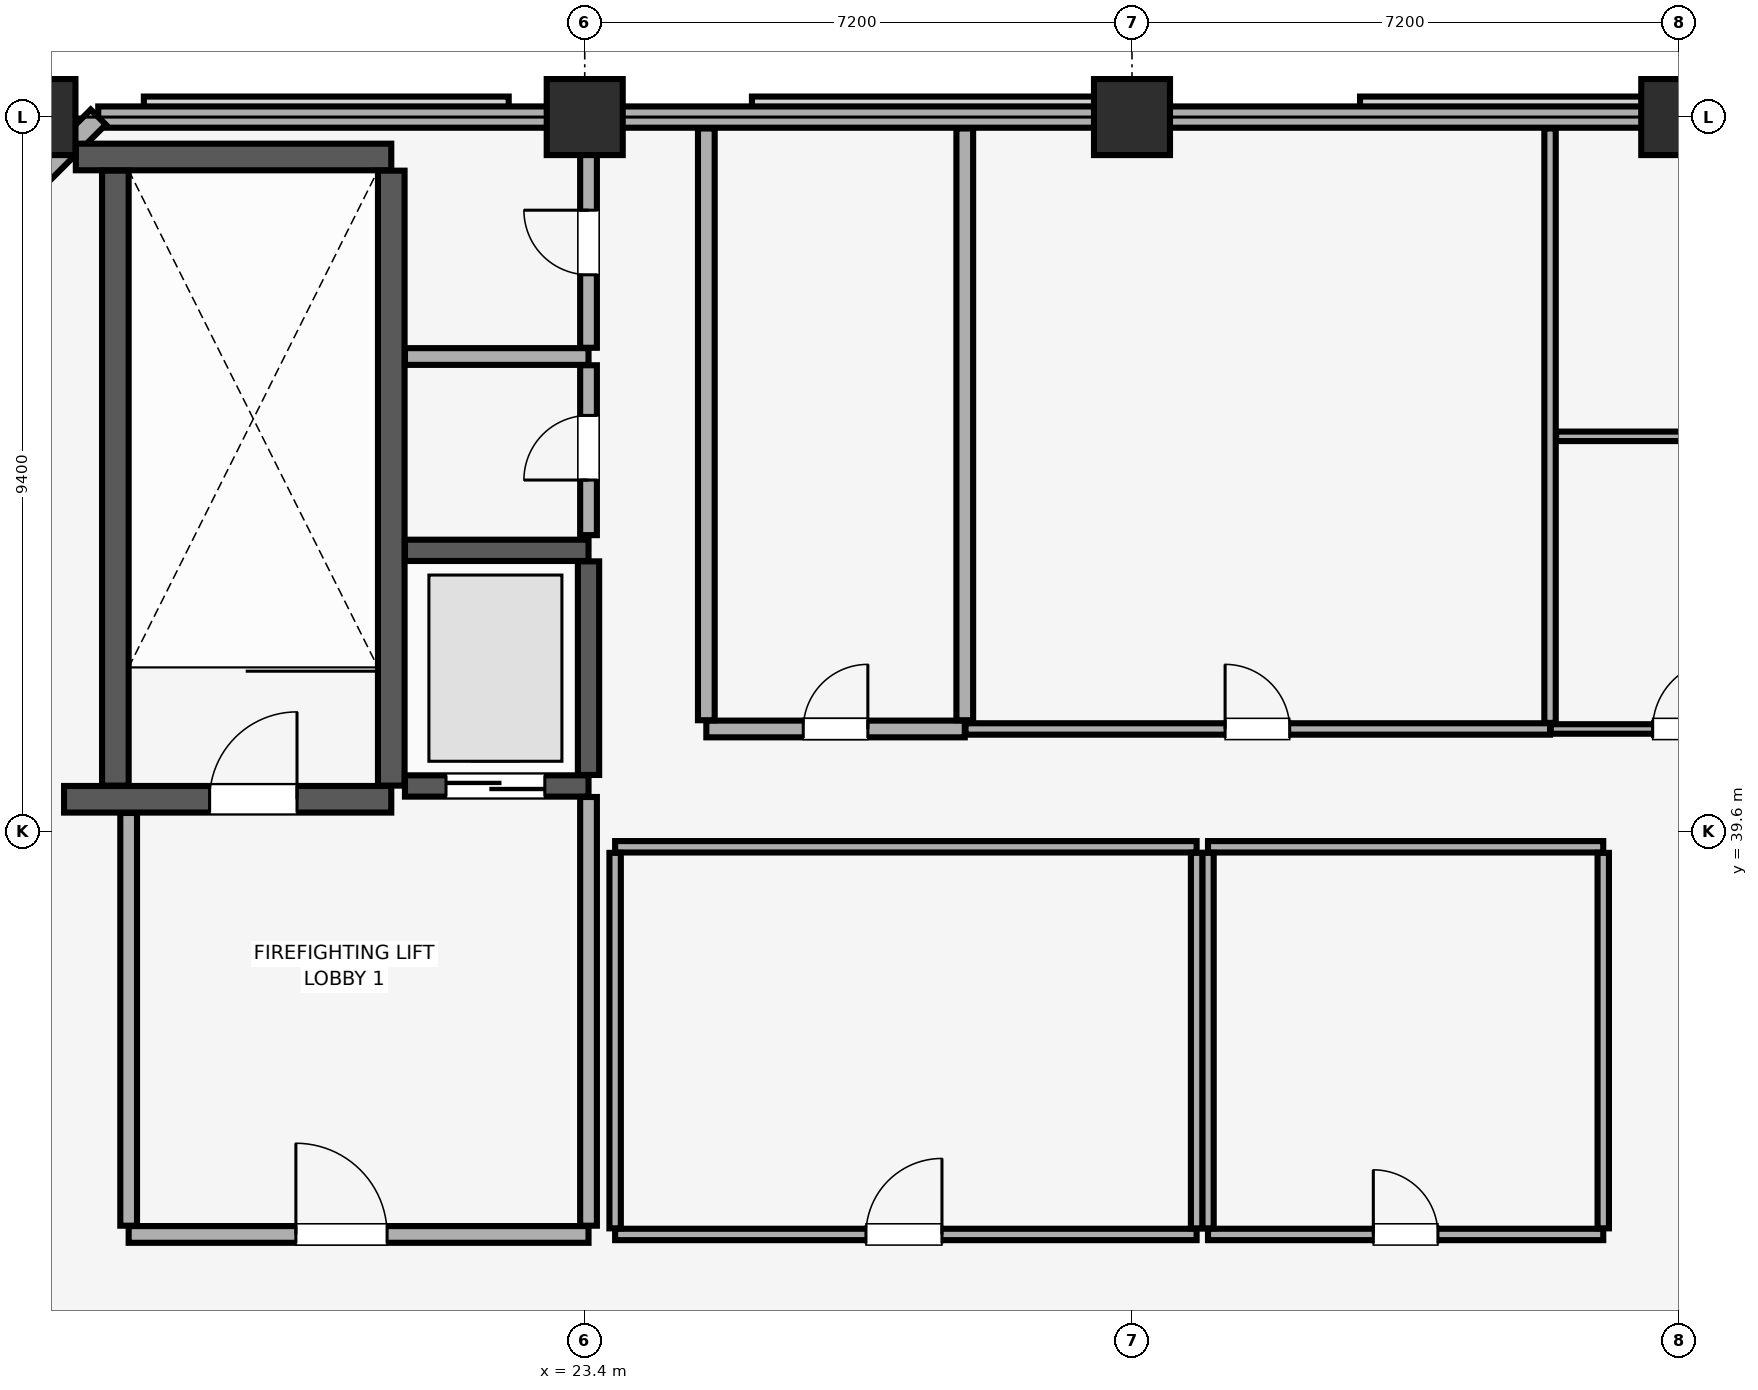
"""IFC4 building model, lengths in metres.
Left out: names, types, materials, properties, quantities, classifications, styles, units other than length and angle.
Written with IfcOpenShell. Run it as: python <this file> out.ifc"""

import sys

from ifc_helpers import new_model, si_unit, direction, frame, frame_2d, origin, origin_2d, place, context, subcontext, project, spatial, rectangle, extrude, element, fill, save


model = new_model("IFC4")
c1 = context("Model", 3, precision=1e-05, world=origin(), true_north=direction((0.0, 1.0)))
c2 = subcontext(c1, "Body", "Model", "MODEL_VIEW")
j1 = project(units=[si_unit("LENGTHUNIT", "METRE"), si_unit("PLANEANGLEUNIT", "RADIAN")], contexts=[c1])
p1 = place(None, origin())
s1 = spatial("IfcSite", under=j1, at=p1, CompositionType="ELEMENT")
p2 = place(p1, origin())
s2 = spatial("IfcBuilding", under=s1, at=p2, CompositionType="ELEMENT")
p3 = place(p2, frame((0.0, 0.0, 310.7)))
s3 = spatial("IfcBuildingStorey", under=s2, at=p3, CompositionType="ELEMENT", Elevation=310.7)
for number, where, z_axis, x_axis in (
    (1, (16.2, 49.0, 0.0), (0.0, 0.0, 1.0), (1.0, 0.0, 0.0)),
    (2, (23.4, 49.0, 0.0), (0.0, 0.0, 1.0), (1.0, 0.0, 0.0)),
    (3, (30.6, 49.0, 0.0), (0.0, 0.0, 1.0), (1.0, 0.0, 0.0)),
    (4, (37.8, 49.0, 0.0), (0.0, 0.0, 1.0), (1.0, 0.0, 0.0)),
):
    element("IfcColumn", number, at=place(p3, frame(where, z_axis=z_axis, x_axis=x_axis)), inside=s3, PredefinedType="COLUMN", context=c2, shape_type="SweptSolid", body=[
        extrude(rectangle(XDim=1.0, YDim=1.0, at=origin_2d()), origin(), (0.0, 0.0, 1.0), 7.5),
    ])
p4 = place(p3, frame((67.0, 49.0, 0.0), z_axis=(0.0, 0.0, 1.0), x_axis=(-1.0, 0.0, 0.0)))
e5 = element("IfcWall", 5, at=p4, inside=s3, PredefinedType="SOLIDWALL", context=c2, shape_type="SweptSolid", body=[
    extrude(rectangle(XDim=50.0, YDim=0.28, at=frame_2d((25.0, 0.0))), origin(), (0.0, 0.0, 1.0), 7.0),
])
p5 = place(p3, frame((17.0, 49.0, 0.0), z_axis=(0.0, 0.0, 1.0), x_axis=(-0.707106781187, -0.707106781187, 0.0)))
e6 = element("IfcWall", 6, at=p5, inside=s3, PredefinedType="SOLIDWALL", context=c2, shape_type="SweptSolid", body=[
    extrude(rectangle(XDim=1.131, YDim=0.28, at=frame_2d((0.566, 0.0))), origin(), (0.0, 0.0, 1.0), 7.5),
])
p6 = place(p3, frame((16.55, 40.025, 0.0), z_axis=(0.0, 0.0, 1.0), x_axis=(1.0, 0.0, 0.0)))
e7 = element("IfcWall", 7, at=p6, inside=s3, PredefinedType="SHEAR", context=c2, shape_type="SweptSolid", body=[
    extrude(rectangle(XDim=4.305, YDim=0.35, at=frame_2d((2.152, 0.0))), origin(), (0.0, 0.0, 1.0), 7.5),
])
p7 = place(p6, frame((1.915, 0.0, 0.0)))
e8 = element("IfcOpeningElement", 8, at=p7, cuts=e7, PredefinedType="OPENING", context=c2, shape_type="SweptSolid", body=[
    extrude(rectangle(XDim=1.15, YDim=2.15, at=frame_2d((0.575, 1.075))), frame((0.0, 0.185, 0.0), z_axis=(0.0, -1.0, 0.0), x_axis=(1.0, 0.0, 0.0)), (0.0, 0.0, 1.0), 0.37),
])
p8 = place(p3, frame((16.705, 48.475, 0.0), z_axis=(0.0, 0.0, 1.0), x_axis=(1.0, 0.0, 0.0)))
e9 = element("IfcWall", 9, at=p8, inside=s3, PredefinedType="SHEAR", context=c2, shape_type="SweptSolid", body=[
    extrude(rectangle(XDim=4.15, YDim=0.35, at=frame_2d((2.075, 0.0))), origin(), (0.0, 0.0, 1.0), 7.5),
])
for number, where, z_axis, x_axis in (
    (10, (17.225, 40.205, 0.0), (0.0, 0.0, 1.0), (0.0, 1.0, 0.0)),
    (11, (20.855, 40.205, 0.0), (0.0, 0.0, 1.0), (0.0, 1.0, 0.0)),
):
    element("IfcWall", number, at=place(p3, frame(where, z_axis=z_axis, x_axis=x_axis)), inside=s3, PredefinedType="SHEAR", context=c2, shape_type="SweptSolid", body=[
        extrude(rectangle(XDim=8.09, YDim=0.35, at=frame_2d((4.045, 0.0))), origin(), (0.0, 0.0, 1.0), 7.5),
    ])
p9 = place(p3, frame((21.035, 40.2, 0.0), z_axis=(0.0, 0.0, 1.0), x_axis=(1.0, 0.0, 0.0)))
e12 = element("IfcWall", 12, at=p9, inside=s3, PredefinedType="SHEAR", context=c2, shape_type="SweptSolid", body=[
    extrude(rectangle(XDim=2.415, YDim=0.28, at=frame_2d((1.208, 0.0))), origin(), (0.0, 0.0, 1.0), 7.5),
])
p10 = place(p9, frame((0.54, 0.0, 0.0)))
e13 = element("IfcOpeningElement", 13, at=p10, cuts=e12, PredefinedType="OPENING", context=c2, shape_type="SweptSolid", body=[
    extrude(rectangle(XDim=1.3, YDim=2.3, at=frame_2d((0.65, 1.15))), frame((0.0, 0.15, 0.0), z_axis=(0.0, -1.0, 0.0), x_axis=(1.0, 0.0, 0.0)), (0.0, 0.0, 1.0), 0.3),
])
p11 = place(p3, frame((21.035, 43.3, 0.0), z_axis=(0.0, 0.0, 1.0), x_axis=(1.0, 0.0, 0.0)))
e14 = element("IfcWall", 14, at=p11, inside=s3, PredefinedType="SHEAR", context=c2, shape_type="SweptSolid", body=[
    extrude(rectangle(XDim=2.415, YDim=0.28, at=frame_2d((1.208, 0.0))), origin(), (0.0, 0.0, 1.0), 7.5),
])
p12 = place(p3, frame((23.45, 40.345, 0.0), z_axis=(0.0, 0.0, 1.0), x_axis=(0.0, 1.0, 0.0)))
e15 = element("IfcWall", 15, at=p12, inside=s3, PredefinedType="SHEAR", context=c2, shape_type="SweptSolid", body=[
    extrude(rectangle(XDim=2.81, YDim=0.28, at=frame_2d((1.405, 0.0))), origin(), (0.0, 0.0, 1.0), 7.5),
])
p13 = place(p3, frame((17.4, 34.3, 0.0), z_axis=(0.0, 0.0, 1.0), x_axis=(1.0, 0.0, 0.0)))
e16 = element("IfcWall", 16, at=p13, inside=s3, PredefinedType="PARTITIONING", context=c2, shape_type="SweptSolid", body=[
    extrude(rectangle(XDim=6.05, YDim=0.22, at=frame_2d((3.025, 0.0))), origin(), (0.0, 0.0, 1.0), 7.5),
])
p14 = place(p13, frame((2.2, 0.0, 0.0)))
e17 = element("IfcOpeningElement", 17, at=p14, cuts=e16, PredefinedType="OPENING", context=c2, shape_type="SweptSolid", body=[
    extrude(rectangle(XDim=1.2, YDim=2.15, at=frame_2d((0.6, 1.075))), frame((0.0, 0.12, 0.0), z_axis=(0.0, -1.0, 0.0), x_axis=(1.0, 0.0, 0.0)), (0.0, 0.0, 1.0), 0.24),
])
p15 = place(p3, frame((17.4, 34.415, 0.0), z_axis=(0.0, 0.0, 1.0), x_axis=(0.0, 1.0, 0.0)))
e18 = element("IfcWall", 18, at=p15, inside=s3, PredefinedType="PARTITIONING", context=c2, shape_type="SweptSolid", body=[
    extrude(rectangle(XDim=5.43, YDim=0.22, at=frame_2d((2.715, 0.0))), origin(), (0.0, 0.0, 1.0), 7.5),
])
p16 = place(p3, frame((23.45, 34.415, 0.0), z_axis=(0.0, 0.0, 1.0), x_axis=(0.0, 1.0, 0.0)))
e19 = element("IfcWall", 19, at=p16, inside=s3, PredefinedType="PARTITIONING", context=c2, shape_type="SweptSolid", body=[
    extrude(rectangle(XDim=5.64, YDim=0.22, at=frame_2d((2.82, 0.0))), origin(), (0.0, 0.0, 1.0), 7.5),
])
p17 = place(p3, frame((21.035, 45.85, 0.0), z_axis=(0.0, 0.0, 1.0), x_axis=(1.0, 0.0, 0.0)))
e20 = element("IfcWall", 20, at=p17, inside=s3, PredefinedType="PARTITIONING", context=c2, shape_type="SweptSolid", body=[
    extrude(rectangle(XDim=2.415, YDim=0.22, at=frame_2d((1.208, 0.0))), origin(), (0.0, 0.0, 1.0), 7.5),
])
p18 = place(p3, frame((23.45, 43.5, 0.0), z_axis=(0.0, 0.0, 1.0), x_axis=(0.0, 1.0, 0.0)))
e21 = element("IfcWall", 21, at=p18, inside=s3, PredefinedType="PARTITIONING", context=c2, shape_type="SweptSolid", body=[
    extrude(rectangle(XDim=2.235, YDim=0.22, at=frame_2d((1.118, 0.0))), origin(), (0.0, 0.0, 1.0), 7.5),
])
p19 = place(p18, frame((0.725, 0.0, 0.0)))
e22 = element("IfcOpeningElement", 22, at=p19, cuts=e21, PredefinedType="OPENING", context=c2, shape_type="SweptSolid", body=[
    extrude(rectangle(XDim=0.85, YDim=2.1, at=frame_2d((0.425, 1.05))), frame((0.0, 0.12, 0.0), z_axis=(0.0, -1.0, 0.0), x_axis=(1.0, 0.0, 0.0)), (0.0, 0.0, 1.0), 0.24),
])
p20 = place(p3, frame((23.45, 45.965, 0.0), z_axis=(0.0, 0.0, 1.0), x_axis=(0.0, 1.0, 0.0)))
e23 = element("IfcWall", 23, at=p20, inside=s3, PredefinedType="PARTITIONING", context=c2, shape_type="SweptSolid", body=[
    extrude(rectangle(XDim=2.885, YDim=0.22, at=frame_2d((1.442, 0.0))), origin(), (0.0, 0.0, 1.0), 7.5),
])
p21 = place(p20, frame((0.96, 0.0, 0.0)))
e24 = element("IfcOpeningElement", 24, at=p21, cuts=e23, PredefinedType="OPENING", context=c2, shape_type="SweptSolid", body=[
    extrude(rectangle(XDim=0.85, YDim=2.1, at=frame_2d((0.425, 1.05))), frame((0.0, 0.12, 0.0), z_axis=(0.0, -1.0, 0.0), x_axis=(1.0, 0.0, 0.0)), (0.0, 0.0, 1.0), 0.24),
])
p22 = place(p3, frame((31.6, 34.3, 0.0), z_axis=(0.0, 0.0, 1.0), x_axis=(1.0, 0.0, 0.0)))
e25 = element("IfcWall", 25, at=p22, inside=s3, PredefinedType="PARTITIONING", context=c2, shape_type="SweptSolid", body=[
    extrude(rectangle(XDim=5.2, YDim=0.15, at=frame_2d((2.6, 0.0))), origin(), (0.0, 0.0, 1.0), 7.5),
])
p23 = place(p22, frame((2.175, 0.0, 0.0)))
e26 = element("IfcOpeningElement", 26, at=p23, cuts=e25, PredefinedType="OPENING", context=c2, shape_type="SweptSolid", body=[
    extrude(rectangle(XDim=0.85, YDim=2.1, at=frame_2d((0.425, 1.05))), frame((0.0, 0.085, 0.0), z_axis=(0.0, -1.0, 0.0), x_axis=(1.0, 0.0, 0.0)), (0.0, 0.0, 1.0), 0.17),
])
p24 = place(p3, frame((31.6, 39.4, 0.0), z_axis=(0.0, 0.0, 1.0), x_axis=(1.0, 0.0, 0.0)))
e27 = element("IfcWall", 27, at=p24, inside=s3, PredefinedType="PARTITIONING", context=c2, shape_type="SweptSolid", body=[
    extrude(rectangle(XDim=5.2, YDim=0.15, at=frame_2d((2.6, 0.0))), origin(), (0.0, 0.0, 1.0), 7.5),
])
for number, where, z_axis, x_axis in (
    (28, (31.6, 34.38, 0.0), (0.0, 0.0, 1.0), (0.0, 1.0, 0.0)),
    (29, (36.8, 34.38, 0.0), (0.0, 0.0, 1.0), (0.0, 1.0, 0.0)),
):
    element("IfcWall", number, at=place(p3, frame(where, z_axis=z_axis, x_axis=x_axis)), inside=s3, PredefinedType="PARTITIONING", context=c2, shape_type="SweptSolid", body=[
        extrude(rectangle(XDim=4.94, YDim=0.15, at=frame_2d((2.47, 0.0))), origin(), (0.0, 0.0, 1.0), 7.5),
    ])
p25 = place(p3, frame((23.8, 34.3, 0.0), z_axis=(0.0, 0.0, 1.0), x_axis=(1.0, 0.0, 0.0)))
e30 = element("IfcWall", 30, at=p25, inside=s3, PredefinedType="PARTITIONING", context=c2, shape_type="SweptSolid", body=[
    extrude(rectangle(XDim=7.65, YDim=0.15, at=frame_2d((3.825, 0.0))), origin(), (0.0, 0.0, 1.0), 7.5),
])
p26 = place(p25, frame((3.3, 0.0, 0.0)))
e31 = element("IfcOpeningElement", 31, at=p26, cuts=e30, PredefinedType="OPENING", context=c2, shape_type="SweptSolid", body=[
    extrude(rectangle(XDim=1.0, YDim=2.15, at=frame_2d((0.5, 1.075))), frame((0.0, 0.085, 0.0), z_axis=(0.0, -1.0, 0.0), x_axis=(1.0, 0.0, 0.0)), (0.0, 0.0, 1.0), 0.17),
])
p27 = place(p3, frame((23.8, 39.4, 0.0), z_axis=(0.0, 0.0, 1.0), x_axis=(1.0, 0.0, 0.0)))
e32 = element("IfcWall", 32, at=p27, inside=s3, PredefinedType="PARTITIONING", context=c2, shape_type="SweptSolid", body=[
    extrude(rectangle(XDim=7.65, YDim=0.15, at=frame_2d((3.825, 0.0))), origin(), (0.0, 0.0, 1.0), 7.5),
])
for number, where, z_axis, x_axis in (
    (33, (23.8, 34.38, 0.0), (0.0, 0.0, 1.0), (0.0, 1.0, 0.0)),
    (34, (31.45, 34.38, 0.0), (0.0, 0.0, 1.0), (0.0, 1.0, 0.0)),
):
    element("IfcWall", number, at=place(p3, frame(where, z_axis=z_axis, x_axis=x_axis)), inside=s3, PredefinedType="PARTITIONING", context=c2, shape_type="SweptSolid", body=[
        extrude(rectangle(XDim=4.94, YDim=0.15, at=frame_2d((2.47, 0.0))), origin(), (0.0, 0.0, 1.0), 7.5),
    ])
p28 = place(p3, frame((25.0, 40.95, 0.0), z_axis=(0.0, 0.0, 1.0), x_axis=(1.0, 0.0, 0.0)))
e35 = element("IfcWall", 35, at=p28, inside=s3, PredefinedType="PARTITIONING", context=c2, shape_type="SweptSolid", body=[
    extrude(rectangle(XDim=3.4, YDim=0.22, at=frame_2d((1.7, 0.0))), origin(), (0.0, 0.0, 1.0), 7.5),
])
p29 = place(p28, frame((1.275, 0.0, 0.0)))
e36 = element("IfcOpeningElement", 36, at=p29, cuts=e35, PredefinedType="OPENING", context=c2, shape_type="SweptSolid", body=[
    extrude(rectangle(XDim=0.85, YDim=2.1, at=frame_2d((0.425, 1.05))), frame((0.0, 0.12, 0.0), z_axis=(0.0, -1.0, 0.0), x_axis=(1.0, 0.0, 0.0)), (0.0, 0.0, 1.0), 0.24),
])
for number, where, z_axis, x_axis in (
    (37, (25.0, 41.065, 0.0), (0.0, 0.0, 1.0), (0.0, 1.0, 0.0)),
    (38, (28.4, 41.065, 0.0), (0.0, 0.0, 1.0), (0.0, 1.0, 0.0)),
):
    element("IfcWall", number, at=place(p3, frame(where, z_axis=z_axis, x_axis=x_axis)), inside=s3, PredefinedType="PARTITIONING", context=c2, shape_type="SweptSolid", body=[
        extrude(rectangle(XDim=7.785, YDim=0.22, at=frame_2d((3.893, 0.0))), origin(), (0.0, 0.0, 1.0), 7.5),
    ])
p30 = place(p3, frame((28.41, 40.95, 0.0), z_axis=(0.0, 0.0, 1.0), x_axis=(1.0, 0.0, 0.0)))
e39 = element("IfcWall", 39, at=p30, inside=s3, PredefinedType="PARTITIONING", context=c2, shape_type="SweptSolid", body=[
    extrude(rectangle(XDim=7.69, YDim=0.15, at=frame_2d((3.845, 0.0))), origin(), (0.0, 0.0, 1.0), 7.5),
])
p31 = place(p30, frame((3.415, 0.0, 0.0)))
e40 = element("IfcOpeningElement", 40, at=p31, cuts=e39, PredefinedType="OPENING", context=c2, shape_type="SweptSolid", body=[
    extrude(rectangle(XDim=0.85, YDim=2.1, at=frame_2d((0.425, 1.05))), frame((0.0, 0.085, 0.0), z_axis=(0.0, -1.0, 0.0), x_axis=(1.0, 0.0, 0.0)), (0.0, 0.0, 1.0), 0.17),
])
p32 = place(p3, frame((36.1, 41.03, 0.0), z_axis=(0.0, 0.0, 1.0), x_axis=(0.0, 1.0, 0.0)))
e41 = element("IfcWall", 41, at=p32, inside=s3, PredefinedType="PARTITIONING", context=c2, shape_type="SweptSolid", body=[
    extrude(rectangle(XDim=7.82, YDim=0.15, at=frame_2d((3.91, 0.0))), origin(), (0.0, 0.0, 1.0), 7.5),
])
p33 = place(p3, frame((36.11, 40.95, 0.0), z_axis=(0.0, 0.0, 1.0), x_axis=(1.0, 0.0, 0.0)))
e42 = element("IfcWall", 42, at=p33, inside=s3, PredefinedType="PARTITIONING", context=c2, shape_type="SweptSolid", body=[
    extrude(rectangle(XDim=3.59, YDim=0.125, at=frame_2d((1.795, 0.0))), origin(), (0.0, 0.0, 1.0), 7.5),
])
p34 = place(p33, frame((1.34, 0.0, 0.0)))
e43 = element("IfcOpeningElement", 43, at=p34, cuts=e42, PredefinedType="OPENING", context=c2, shape_type="SweptSolid", body=[
    extrude(rectangle(XDim=0.9, YDim=2.1, at=frame_2d((0.45, 1.05))), frame((0.0, 0.073, 0.0), z_axis=(0.0, -1.0, 0.0), x_axis=(1.0, 0.0, 0.0)), (0.0, 0.0, 1.0), 0.145),
])
p35 = place(p3, frame((36.18, 44.8, 0.0), z_axis=(0.0, 0.0, 1.0), x_axis=(1.0, 0.0, 0.0)))
e44 = element("IfcWall", 44, at=p35, inside=s3, PredefinedType="PARTITIONING", context=c2, shape_type="SweptSolid", body=[
    extrude(rectangle(XDim=3.52, YDim=0.125, at=frame_2d((1.76, 0.0))), origin(), (0.0, 0.0, 1.0), 7.5),
])
p36 = place(p7, origin())
e45 = element("IfcDoor", 45, at=p36, inside=s3, OperationType="SINGLE_SWING_RIGHT", PredefinedType="DOOR", context=c2, shape_type="SweptSolid", body=[
    extrude(rectangle(XDim=1.15, YDim=2.15, at=frame_2d((0.575, 1.075))), frame((0.0, 0.025, 0.0), z_axis=(0.0, -1.0, 0.0), x_axis=(1.0, 0.0, 0.0)), (0.0, 0.0, 1.0), 0.05),
])
fill(e8, e45)
p37 = place(p10, origin())
e46 = element("IfcDoor", 46, at=p37, inside=s3, OperationType="DOUBLE_DOOR_SLIDING", PredefinedType="DOOR", context=c2, shape_type="SweptSolid", body=[
    extrude(rectangle(XDim=1.3, YDim=2.3, at=frame_2d((0.65, 1.15))), frame((0.0, 0.025, 0.0), z_axis=(0.0, -1.0, 0.0), x_axis=(1.0, 0.0, 0.0)), (0.0, 0.0, 1.0), 0.05),
])
fill(e13, e46)
p38 = place(p14, origin())
e47 = element("IfcDoor", 47, at=p38, inside=s3, OperationType="SINGLE_SWING_LEFT", PredefinedType="DOOR", context=c2, shape_type="SweptSolid", body=[
    extrude(rectangle(XDim=1.2, YDim=2.15, at=frame_2d((0.6, 1.075))), frame((0.0, 0.025, 0.0), z_axis=(0.0, -1.0, 0.0), x_axis=(1.0, 0.0, 0.0)), (0.0, 0.0, 1.0), 0.05),
])
fill(e17, e47)
p39 = place(p19, origin())
e48 = element("IfcDoor", 48, at=p39, inside=s3, OperationType="SINGLE_SWING_LEFT", PredefinedType="DOOR", context=c2, shape_type="SweptSolid", body=[
    extrude(rectangle(XDim=0.85, YDim=2.1, at=frame_2d((0.425, 1.05))), frame((0.0, 0.025, 0.0), z_axis=(0.0, -1.0, 0.0), x_axis=(1.0, 0.0, 0.0)), (0.0, 0.0, 1.0), 0.05),
])
fill(e22, e48)
p40 = place(p21, origin())
e49 = element("IfcDoor", 49, at=p40, inside=s3, OperationType="SINGLE_SWING_RIGHT", PredefinedType="DOOR", context=c2, shape_type="SweptSolid", body=[
    extrude(rectangle(XDim=0.85, YDim=2.1, at=frame_2d((0.425, 1.05))), frame((0.0, 0.025, 0.0), z_axis=(0.0, -1.0, 0.0), x_axis=(1.0, 0.0, 0.0)), (0.0, 0.0, 1.0), 0.05),
])
fill(e24, e49)
p41 = place(p23, origin())
e50 = element("IfcDoor", 50, at=p41, inside=s3, OperationType="SINGLE_SWING_LEFT", PredefinedType="DOOR", context=c2, shape_type="SweptSolid", body=[
    extrude(rectangle(XDim=0.85, YDim=2.1, at=frame_2d((0.425, 1.05))), frame((0.0, 0.025, 0.0), z_axis=(0.0, -1.0, 0.0), x_axis=(1.0, 0.0, 0.0)), (0.0, 0.0, 1.0), 0.05),
])
fill(e26, e50)
p42 = place(p26, origin())
e51 = element("IfcDoor", 51, at=p42, inside=s3, OperationType="SINGLE_SWING_RIGHT", PredefinedType="DOOR", context=c2, shape_type="SweptSolid", body=[
    extrude(rectangle(XDim=1.0, YDim=2.15, at=frame_2d((0.5, 1.075))), frame((0.0, 0.025, 0.0), z_axis=(0.0, -1.0, 0.0), x_axis=(1.0, 0.0, 0.0)), (0.0, 0.0, 1.0), 0.05),
])
fill(e31, e51)
p43 = place(p29, origin())
e52 = element("IfcDoor", 52, at=p43, inside=s3, OperationType="SINGLE_SWING_RIGHT", PredefinedType="DOOR", context=c2, shape_type="SweptSolid", body=[
    extrude(rectangle(XDim=0.85, YDim=2.1, at=frame_2d((0.425, 1.05))), frame((0.0, 0.025, 0.0), z_axis=(0.0, -1.0, 0.0), x_axis=(1.0, 0.0, 0.0)), (0.0, 0.0, 1.0), 0.05),
])
fill(e36, e52)
p44 = place(p31, origin())
e53 = element("IfcDoor", 53, at=p44, inside=s3, OperationType="SINGLE_SWING_LEFT", PredefinedType="DOOR", context=c2, shape_type="SweptSolid", body=[
    extrude(rectangle(XDim=0.85, YDim=2.1, at=frame_2d((0.425, 1.05))), frame((0.0, 0.025, 0.0), z_axis=(0.0, -1.0, 0.0), x_axis=(1.0, 0.0, 0.0)), (0.0, 0.0, 1.0), 0.05),
])
fill(e40, e53)
p45 = place(p34, origin())
e54 = element("IfcDoor", 54, at=p45, inside=s3, OperationType="SINGLE_SWING_RIGHT", PredefinedType="DOOR", context=c2, shape_type="SweptSolid", body=[
    extrude(rectangle(XDim=0.9, YDim=2.1, at=frame_2d((0.45, 1.05))), frame((0.0, 0.025, 0.0), z_axis=(0.0, -1.0, 0.0), x_axis=(1.0, 0.0, 0.0)), (0.0, 0.0, 1.0), 0.05),
])
fill(e43, e54)
save(model, sys.argv[1])
